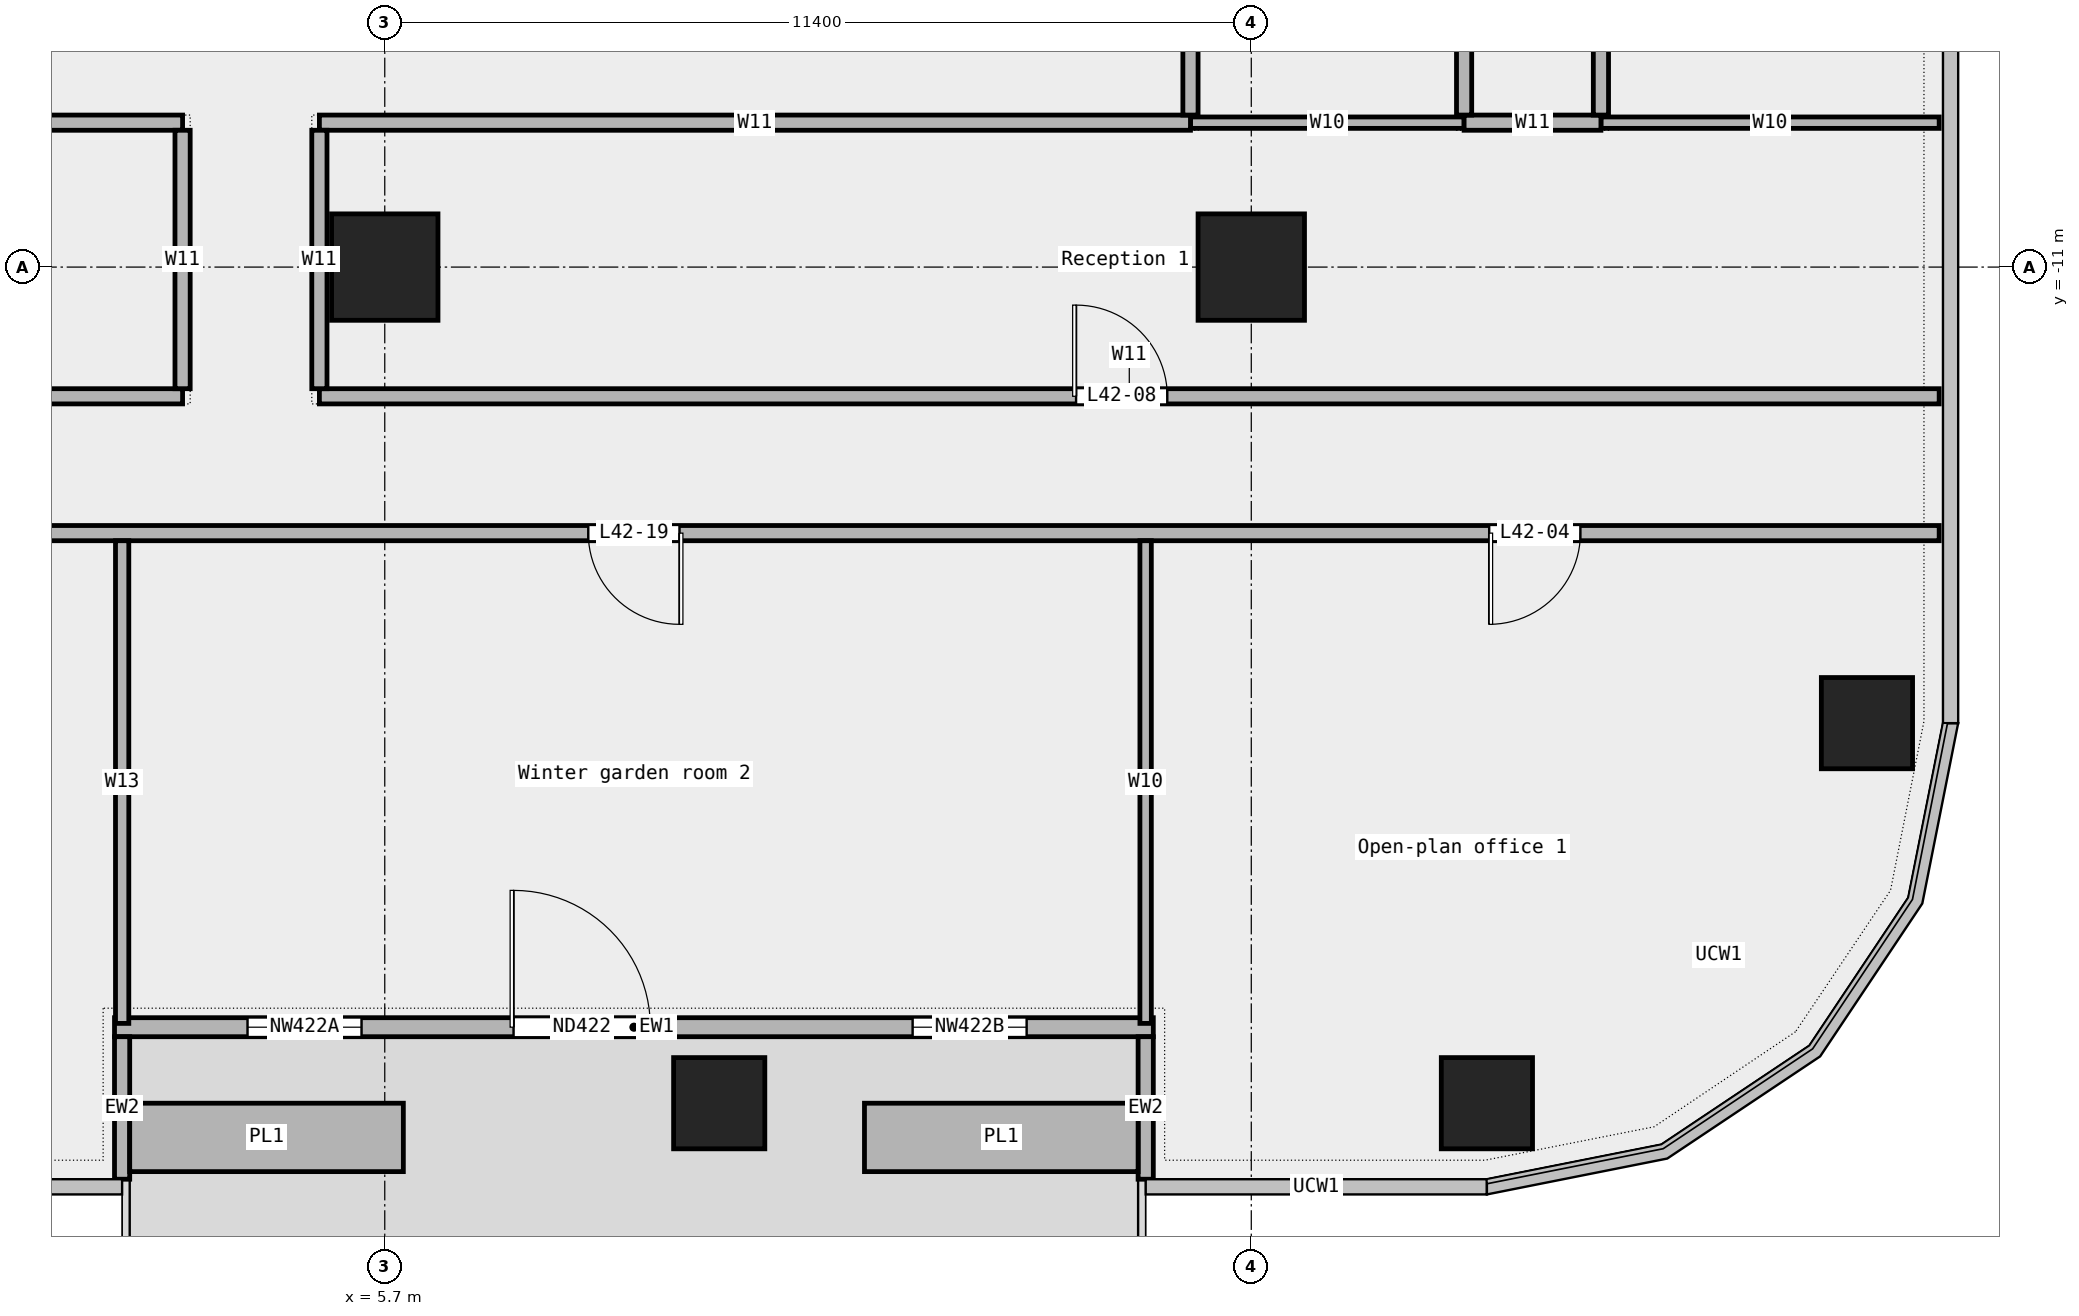
"""IFC4 building model, lengths in metres.
Left out: names, types, materials, properties, quantities, classifications, styles, units other than length and angle.
Written with IfcOpenShell. Run it as: python <this file> out.ifc"""

import sys

from ifc_helpers import new_model, si_unit, direction, frame, frame_2d, origin, origin_2d, place, context, subcontext, project, spatial, rectangle, extrude, element, fill, save


model = new_model("IFC4")
c1 = context("Model", 3, precision=1e-05, world=origin(), true_north=direction((0.0, 1.0)))
c2 = subcontext(c1, "Body", "Model", "MODEL_VIEW")
j1 = project(units=[si_unit("LENGTHUNIT", "METRE"), si_unit("PLANEANGLEUNIT", "RADIAN")], contexts=[c1])
p1 = place(None, origin())
s1 = spatial("IfcSite", under=j1, at=p1, CompositionType="ELEMENT")
p2 = place(p1, origin())
s2 = spatial("IfcBuilding", under=s1, at=p2, CompositionType="ELEMENT")
p3 = place(p2, frame((0.0, 0.0, 201.0)))
s3 = spatial("IfcBuildingStorey", under=s2, at=p3, CompositionType="ELEMENT", Elevation=201.0)
for number, where, z_axis, x_axis in (
    (1, (10.1, -22.0, 0.0), (0.0, 0.0, 1.0), (1.0, 0.0, 0.0)),
    (2, (20.2, -22.0, 0.0), (0.0, 0.0, 1.0), (1.0, 0.0, 0.0)),
    (3, (25.2, -17.0, 0.0), (0.0, 0.0, 1.0), (1.0, 0.0, 0.0)),
):
    element("IfcColumn", number, at=place(p3, frame(where, z_axis=z_axis, x_axis=x_axis)), inside=s3, PredefinedType="COLUMN", context=c2, shape_type="SweptSolid", body=[
        extrude(rectangle(XDim=1.2, YDim=1.2, at=origin_2d()), origin(), (0.0, 0.0, 1.0), 3.4),
    ])
for number, where, z_axis, x_axis in (
    (4, (5.7, -11.0, 0.0), (0.0, 0.0, 1.0), (1.0, 0.0, 0.0)),
    (5, (17.1, -11.0, 0.0), (0.0, 0.0, 1.0), (1.0, 0.0, 0.0)),
):
    element("IfcColumn", number, at=place(p3, frame(where, z_axis=z_axis, x_axis=x_axis)), inside=s3, PredefinedType="COLUMN", context=c2, shape_type="SweptSolid", body=[
        extrude(rectangle(XDim=1.4, YDim=1.4, at=origin_2d()), origin(), (0.0, 0.0, 1.0), 3.4),
    ])
p4 = place(p3, frame((2.145, -21.0, 0.0), z_axis=(0.0, 0.0, 1.0), x_axis=(1.0, 0.0, 0.0)))
e6 = element("IfcWall", 6, at=p4, inside=s3, PredefinedType="STANDARD", context=c2, shape_type="SweptSolid", body=[
    extrude(rectangle(XDim=13.667, YDim=0.25, at=frame_2d((6.833, 0.0))), origin(), (0.0, 0.0, 1.0), 3.4),
])
p5 = place(p4, frame((1.75, 0.0, 0.45)))
e7 = element("IfcOpeningElement", 7, at=p5, cuts=e6, PredefinedType="OPENING", context=c2, shape_type="SweptSolid", body=[
    extrude(rectangle(XDim=1.5, YDim=2.4, at=frame_2d((0.75, 1.2))), frame((0.0, 0.137, 0.0), z_axis=(0.0, -1.0, 0.0), x_axis=(1.0, 0.0, 0.0)), (0.0, 0.0, 1.0), 0.274),
])
p6 = place(p4, frame((5.25, 0.0, 0.0)))
e8 = element("IfcOpeningElement", 8, at=p6, cuts=e6, PredefinedType="OPENING", context=c2, shape_type="SweptSolid", body=[
    extrude(rectangle(XDim=1.8, YDim=2.4, at=frame_2d((0.9, 1.2))), frame((0.0, 0.137, 0.0), z_axis=(0.0, -1.0, 0.0), x_axis=(1.0, 0.0, 0.0)), (0.0, 0.0, 1.0), 0.274),
])
p7 = place(p4, frame((10.5, 0.0, 0.45)))
e9 = element("IfcOpeningElement", 9, at=p7, cuts=e6, PredefinedType="OPENING", context=c2, shape_type="SweptSolid", body=[
    extrude(rectangle(XDim=1.5, YDim=2.4, at=frame_2d((0.75, 1.2))), frame((0.0, 0.137, 0.0), z_axis=(0.0, -1.0, 0.0), x_axis=(1.0, 0.0, 0.0)), (0.0, 0.0, 1.0), 0.274),
])
for number, where, z_axis, x_axis in (
    (10, (2.244, -23.0, 0.0), (0.0, 0.0, 1.0), (0.0, 1.0, 0.0)),
    (11, (15.711, -23.0, 0.0), (0.0, 0.0, 1.0), (0.0, 1.0, 0.0)),
):
    element("IfcWall", number, at=place(p3, frame(where, z_axis=z_axis, x_axis=x_axis)), inside=s3, PredefinedType="STANDARD", context=c2, shape_type="SweptSolid", body=[
        extrude(rectangle(XDim=1.875, YDim=0.2, at=frame_2d((0.938, 0.0))), origin(), (0.0, 0.0, 1.0), 3.4),
    ])
for number, where, z_axis, x_axis in (
    (12, (2.344, -22.45, 0.0), (0.0, 0.0, 1.0), (1.0, 0.0, 0.0)),
    (13, (12.011, -22.45, 0.0), (0.0, 0.0, 1.0), (1.0, 0.0, 0.0)),
):
    element("IfcWall", number, at=place(p3, frame(where, z_axis=z_axis, x_axis=x_axis)), inside=s3, PredefinedType="STANDARD", context=c2, shape_type="SweptSolid", body=[
        extrude(rectangle(XDim=3.6, YDim=0.9, at=frame_2d((1.8, 0.0))), origin(), (0.0, 0.0, 1.0), 0.7),
    ])
p8 = place(p3, frame((-26.15, -14.5, 0.0), z_axis=(0.0, 0.0, 1.0), x_axis=(1.0, 0.0, 0.0)))
e14 = element("IfcWall", 14, at=p8, inside=s3, PredefinedType="PARTITIONING", context=c2, shape_type="SweptSolid", body=[
    extrude(rectangle(XDim=52.3, YDim=0.2, at=frame_2d((26.15, 0.0))), origin(), (0.0, 0.0, 1.0), 3.4),
])
p9 = place(p8, frame((46.38, 0.0, 0.0)))
e15 = element("IfcOpeningElement", 15, at=p9, cuts=e14, PredefinedType="OPENING", context=c2, shape_type="SweptSolid", body=[
    extrude(rectangle(XDim=1.2, YDim=2.1, at=frame_2d((0.6, 1.05))), frame((0.0, 0.112, 0.0), z_axis=(0.0, -1.0, 0.0), x_axis=(1.0, 0.0, 0.0)), (0.0, 0.0, 1.0), 0.224),
])
p10 = place(p8, frame((5.938, 0.0, 0.0)))
e16 = element("IfcOpeningElement", 16, at=p10, cuts=e14, PredefinedType="OPENING", context=c2, shape_type="SweptSolid", body=[
    extrude(rectangle(XDim=1.5, YDim=2.1, at=frame_2d((0.75, 1.05))), frame((0.0, 0.112, 0.0), z_axis=(0.0, -1.0, 0.0), x_axis=(1.0, 0.0, 0.0)), (0.0, 0.0, 1.0), 0.224),
])
p11 = place(p8, frame((20.035, 0.0, 0.0)))
e17 = element("IfcOpeningElement", 17, at=p11, cuts=e14, PredefinedType="OPENING", context=c2, shape_type="SweptSolid", body=[
    extrude(rectangle(XDim=1.5, YDim=2.1, at=frame_2d((0.75, 1.05))), frame((0.0, 0.112, 0.0), z_axis=(0.0, -1.0, 0.0), x_axis=(1.0, 0.0, 0.0)), (0.0, 0.0, 1.0), 0.224),
])
p12 = place(p8, frame((34.528, 0.0, 0.0)))
e18 = element("IfcOpeningElement", 18, at=p12, cuts=e14, PredefinedType="OPENING", context=c2, shape_type="SweptSolid", body=[
    extrude(rectangle(XDim=1.2, YDim=2.1, at=frame_2d((0.6, 1.05))), frame((0.0, 0.112, 0.0), z_axis=(0.0, -1.0, 0.0), x_axis=(1.0, 0.0, 0.0)), (0.0, 0.0, 1.0), 0.224),
])
p13 = place(p3, frame((-9.385, -12.7, 0.0), z_axis=(0.0, 0.0, 1.0), x_axis=(1.0, 0.0, 0.0)))
e19 = element("IfcWall", 19, at=p13, inside=s3, PredefinedType="PARTITIONING", context=c2, shape_type="SweptSolid", body=[
    extrude(rectangle(XDim=12.425, YDim=0.2, at=frame_2d((6.212, 0.0))), origin(), (0.0, 0.0, 1.0), 3.4),
])
p14 = place(p3, frame((4.84, -12.7, 0.0), z_axis=(0.0, 0.0, 1.0), x_axis=(1.0, 0.0, 0.0)))
e20 = element("IfcWall", 20, at=p14, inside=s3, PredefinedType="PARTITIONING", context=c2, shape_type="SweptSolid", body=[
    extrude(rectangle(XDim=21.31, YDim=0.2, at=frame_2d((10.655, 0.0))), origin(), (0.0, 0.0, 1.0), 3.4),
])
p15 = place(p14, frame((9.955, 0.0, 0.0)))
e21 = element("IfcOpeningElement", 21, at=p15, cuts=e20, PredefinedType="OPENING", context=c2, shape_type="SweptSolid", body=[
    extrude(rectangle(XDim=1.2, YDim=2.1, at=frame_2d((0.6, 1.05))), frame((0.0, 0.112, 0.0), z_axis=(0.0, -1.0, 0.0), x_axis=(1.0, 0.0, 0.0)), (0.0, 0.0, 1.0), 0.224),
])
p16 = place(p3, frame((16.3, -9.1, 0.0), z_axis=(0.0, 0.0, 1.0), x_axis=(1.0, 0.0, 0.0)))
e22 = element("IfcWall", 22, at=p16, inside=s3, PredefinedType="PARTITIONING", context=c2, shape_type="SweptSolid", body=[
    extrude(rectangle(XDim=3.6, YDim=0.15, at=frame_2d((1.8, 0.0))), origin(), (0.0, 0.0, 1.0), 3.4),
])
p17 = place(p3, frame((21.7, -9.1, 0.0), z_axis=(0.0, 0.0, 1.0), x_axis=(1.0, 0.0, 0.0)))
e23 = element("IfcWall", 23, at=p17, inside=s3, PredefinedType="PARTITIONING", context=c2, shape_type="SweptSolid", body=[
    extrude(rectangle(XDim=4.45, YDim=0.15, at=frame_2d((2.225, 0.0))), origin(), (0.0, 0.0, 1.0), 3.4),
])
p18 = place(p3, frame((-9.385, -9.1, 0.0), z_axis=(0.0, 0.0, 1.0), x_axis=(1.0, 0.0, 0.0)))
e24 = element("IfcWall", 24, at=p18, inside=s3, PredefinedType="PARTITIONING", context=c2, shape_type="SweptSolid", body=[
    extrude(rectangle(XDim=12.425, YDim=0.2, at=frame_2d((6.212, 0.0))), origin(), (0.0, 0.0, 1.0), 3.4),
])
p19 = place(p18, frame((5.762, 0.0, 0.0)))
e25 = element("IfcOpeningElement", 25, at=p19, cuts=e24, PredefinedType="OPENING", context=c2, shape_type="SweptSolid", body=[
    extrude(rectangle(XDim=0.9, YDim=2.1, at=frame_2d((0.45, 1.05))), frame((0.0, 0.112, 0.0), z_axis=(0.0, -1.0, 0.0), x_axis=(1.0, 0.0, 0.0)), (0.0, 0.0, 1.0), 0.224),
])
p20 = place(p3, frame((4.84, -9.1, 0.0), z_axis=(0.0, 0.0, 1.0), x_axis=(1.0, 0.0, 0.0)))
e26 = element("IfcWall", 26, at=p20, inside=s3, PredefinedType="PARTITIONING", context=c2, shape_type="SweptSolid", body=[
    extrude(rectangle(XDim=11.46, YDim=0.2, at=frame_2d((5.73, 0.0))), origin(), (0.0, 0.0, 1.0), 3.4),
])
p21 = place(p3, frame((19.9, -9.1, 0.0), z_axis=(0.0, 0.0, 1.0), x_axis=(1.0, 0.0, 0.0)))
e27 = element("IfcWall", 27, at=p21, inside=s3, PredefinedType="PARTITIONING", context=c2, shape_type="SweptSolid", body=[
    extrude(rectangle(XDim=1.8, YDim=0.2, at=frame_2d((0.9, 0.0))), origin(), (0.0, 0.0, 1.0), 3.4),
])
p22 = place(p3, frame((2.245, -20.95, 0.0), z_axis=(0.0, 0.0, 1.0), x_axis=(0.0, 1.0, 0.0)))
e28 = element("IfcWall", 28, at=p22, inside=s3, PredefinedType="PARTITIONING", context=c2, shape_type="SweptSolid", body=[
    extrude(rectangle(XDim=6.35, YDim=0.175, at=frame_2d((3.175, 0.0))), origin(), (0.0, 0.0, 1.0), 3.4),
])
for number, where, z_axis, x_axis in (
    (29, (3.04, -12.6, 0.0), (0.0, 0.0, 1.0), (0.0, 1.0, 0.0)),
    (30, (4.84, -12.6, 0.0), (0.0, 0.0, 1.0), (0.0, 1.0, 0.0)),
):
    element("IfcWall", number, at=place(p3, frame(where, z_axis=z_axis, x_axis=x_axis)), inside=s3, PredefinedType="PARTITIONING", context=c2, shape_type="SweptSolid", body=[
        extrude(rectangle(XDim=3.4, YDim=0.2, at=frame_2d((1.7, 0.0))), origin(), (0.0, 0.0, 1.0), 3.4),
    ])
p23 = place(p3, frame((15.71, -20.95, 0.0), z_axis=(0.0, 0.0, 1.0), x_axis=(0.0, 1.0, 0.0)))
e31 = element("IfcWall", 31, at=p23, inside=s3, PredefinedType="PARTITIONING", context=c2, shape_type="SweptSolid", body=[
    extrude(rectangle(XDim=6.35, YDim=0.15, at=frame_2d((3.175, 0.0))), origin(), (0.0, 0.0, 1.0), 3.4),
])
p24 = place(p3, frame((16.3, -9.0, 0.0), z_axis=(0.0, 0.0, 1.0), x_axis=(0.0, 1.0, 0.0)))
e32 = element("IfcWall", 32, at=p24, inside=s3, PredefinedType="PARTITIONING", context=c2, shape_type="SweptSolid", body=[
    extrude(rectangle(XDim=8.3, YDim=0.2, at=frame_2d((4.15, 0.0))), origin(), (0.0, 0.0, 1.0), 3.4),
])
p25 = place(p3, frame((19.9, -9.0, 0.0), z_axis=(0.0, 0.0, 1.0), x_axis=(0.0, 1.0, 0.0)))
e33 = element("IfcWall", 33, at=p25, inside=s3, PredefinedType="PARTITIONING", context=c2, shape_type="SweptSolid", body=[
    extrude(rectangle(XDim=11.15, YDim=0.2, at=frame_2d((5.575, 0.0))), origin(), (0.0, 0.0, 1.0), 3.4),
])
p26 = place(p25, frame((5.125, 0.0, 0.0)))
e34 = element("IfcOpeningElement", 34, at=p26, cuts=e33, PredefinedType="OPENING", context=c2, shape_type="SweptSolid", body=[
    extrude(rectangle(XDim=0.9, YDim=2.1, at=frame_2d((0.45, 1.05))), frame((0.0, 0.112, 0.0), z_axis=(0.0, -1.0, 0.0), x_axis=(1.0, 0.0, 0.0)), (0.0, 0.0, 1.0), 0.224),
])
p27 = place(p3, frame((21.7, -9.0, 0.0), z_axis=(0.0, 0.0, 1.0), x_axis=(0.0, 1.0, 0.0)))
e35 = element("IfcWall", 35, at=p27, inside=s3, PredefinedType="PARTITIONING", context=c2, shape_type="SweptSolid", body=[
    extrude(rectangle(XDim=24.3, YDim=0.2, at=frame_2d((12.15, 0.0))), origin(), (0.0, 0.0, 1.0), 3.4),
])
p28 = place(p27, frame((4.795, 0.0, 0.0)))
e36 = element("IfcOpeningElement", 36, at=p28, cuts=e35, PredefinedType="OPENING", context=c2, shape_type="SweptSolid", body=[
    extrude(rectangle(XDim=1.2, YDim=2.1, at=frame_2d((0.6, 1.05))), frame((0.0, 0.112, 0.0), z_axis=(0.0, -1.0, 0.0), x_axis=(1.0, 0.0, 0.0)), (0.0, 0.0, 1.0), 0.224),
])
p29 = place(p27, frame((16.795, 0.0, 0.0)))
e37 = element("IfcOpeningElement", 37, at=p29, cuts=e35, PredefinedType="OPENING", context=c2, shape_type="SweptSolid", body=[
    extrude(rectangle(XDim=1.5, YDim=2.1, at=frame_2d((0.75, 1.05))), frame((0.0, 0.112, 0.0), z_axis=(0.0, -1.0, 0.0), x_axis=(1.0, 0.0, 0.0)), (0.0, 0.0, 1.0), 0.224),
])
p30 = place(p5, origin())
e38 = element("IfcWindow", 38, at=p30, inside=s3, PartitioningType="SINGLE_PANEL", PredefinedType="WINDOW", context=c2, shape_type="SweptSolid", body=[
    extrude(rectangle(XDim=1.5, YDim=2.4, at=frame_2d((0.75, 1.2))), frame((0.0, 0.03, 0.0), z_axis=(0.0, -1.0, 0.0), x_axis=(1.0, 0.0, 0.0)), (0.0, 0.0, 1.0), 0.06),
])
fill(e7, e38)
p31 = place(p6, origin())
e39 = element("IfcDoor", 39, at=p31, inside=s3, OperationType="DOUBLE_DOOR_SINGLE_SWING", PredefinedType="DOOR", context=c2, shape_type="SweptSolid", body=[
    extrude(rectangle(XDim=1.8, YDim=2.4, at=frame_2d((0.9, 1.2))), frame((0.0, 0.025, 0.0), z_axis=(0.0, -1.0, 0.0), x_axis=(1.0, 0.0, 0.0)), (0.0, 0.0, 1.0), 0.05),
])
fill(e8, e39)
p32 = place(p7, origin())
e40 = element("IfcWindow", 40, at=p32, inside=s3, PartitioningType="SINGLE_PANEL", PredefinedType="WINDOW", context=c2, shape_type="SweptSolid", body=[
    extrude(rectangle(XDim=1.5, YDim=2.4, at=frame_2d((0.75, 1.2))), frame((0.0, 0.03, 0.0), z_axis=(0.0, -1.0, 0.0), x_axis=(1.0, 0.0, 0.0)), (0.0, 0.0, 1.0), 0.06),
])
fill(e9, e40)
p33 = place(p9, origin())
e41 = element("IfcDoor", 41, at=p33, inside=s3, OperationType="SINGLE_SWING_RIGHT", PredefinedType="DOOR", context=c2, shape_type="SweptSolid", body=[
    extrude(rectangle(XDim=1.2, YDim=2.1, at=frame_2d((0.6, 1.05))), frame((0.0, 0.025, 0.0), z_axis=(0.0, -1.0, 0.0), x_axis=(1.0, 0.0, 0.0)), (0.0, 0.0, 1.0), 0.05),
])
fill(e15, e41)
p34 = place(p15, origin())
e42 = element("IfcDoor", 42, at=p34, inside=s3, OperationType="SINGLE_SWING_LEFT", PredefinedType="DOOR", context=c2, shape_type="SweptSolid", body=[
    extrude(rectangle(XDim=1.2, YDim=2.1, at=frame_2d((0.6, 1.05))), frame((0.0, 0.025, 0.0), z_axis=(0.0, -1.0, 0.0), x_axis=(1.0, 0.0, 0.0)), (0.0, 0.0, 1.0), 0.05),
])
fill(e21, e42)
p35 = place(p12, origin())
e43 = element("IfcDoor", 43, at=p35, inside=s3, OperationType="SINGLE_SWING_LEFT", PredefinedType="DOOR", context=c2, shape_type="SweptSolid", body=[
    extrude(rectangle(XDim=1.2, YDim=2.1, at=frame_2d((0.6, 1.05))), frame((0.0, 0.025, 0.0), z_axis=(0.0, -1.0, 0.0), x_axis=(1.0, 0.0, 0.0)), (0.0, 0.0, 1.0), 0.05),
])
fill(e18, e43)
save(model, sys.argv[1])
